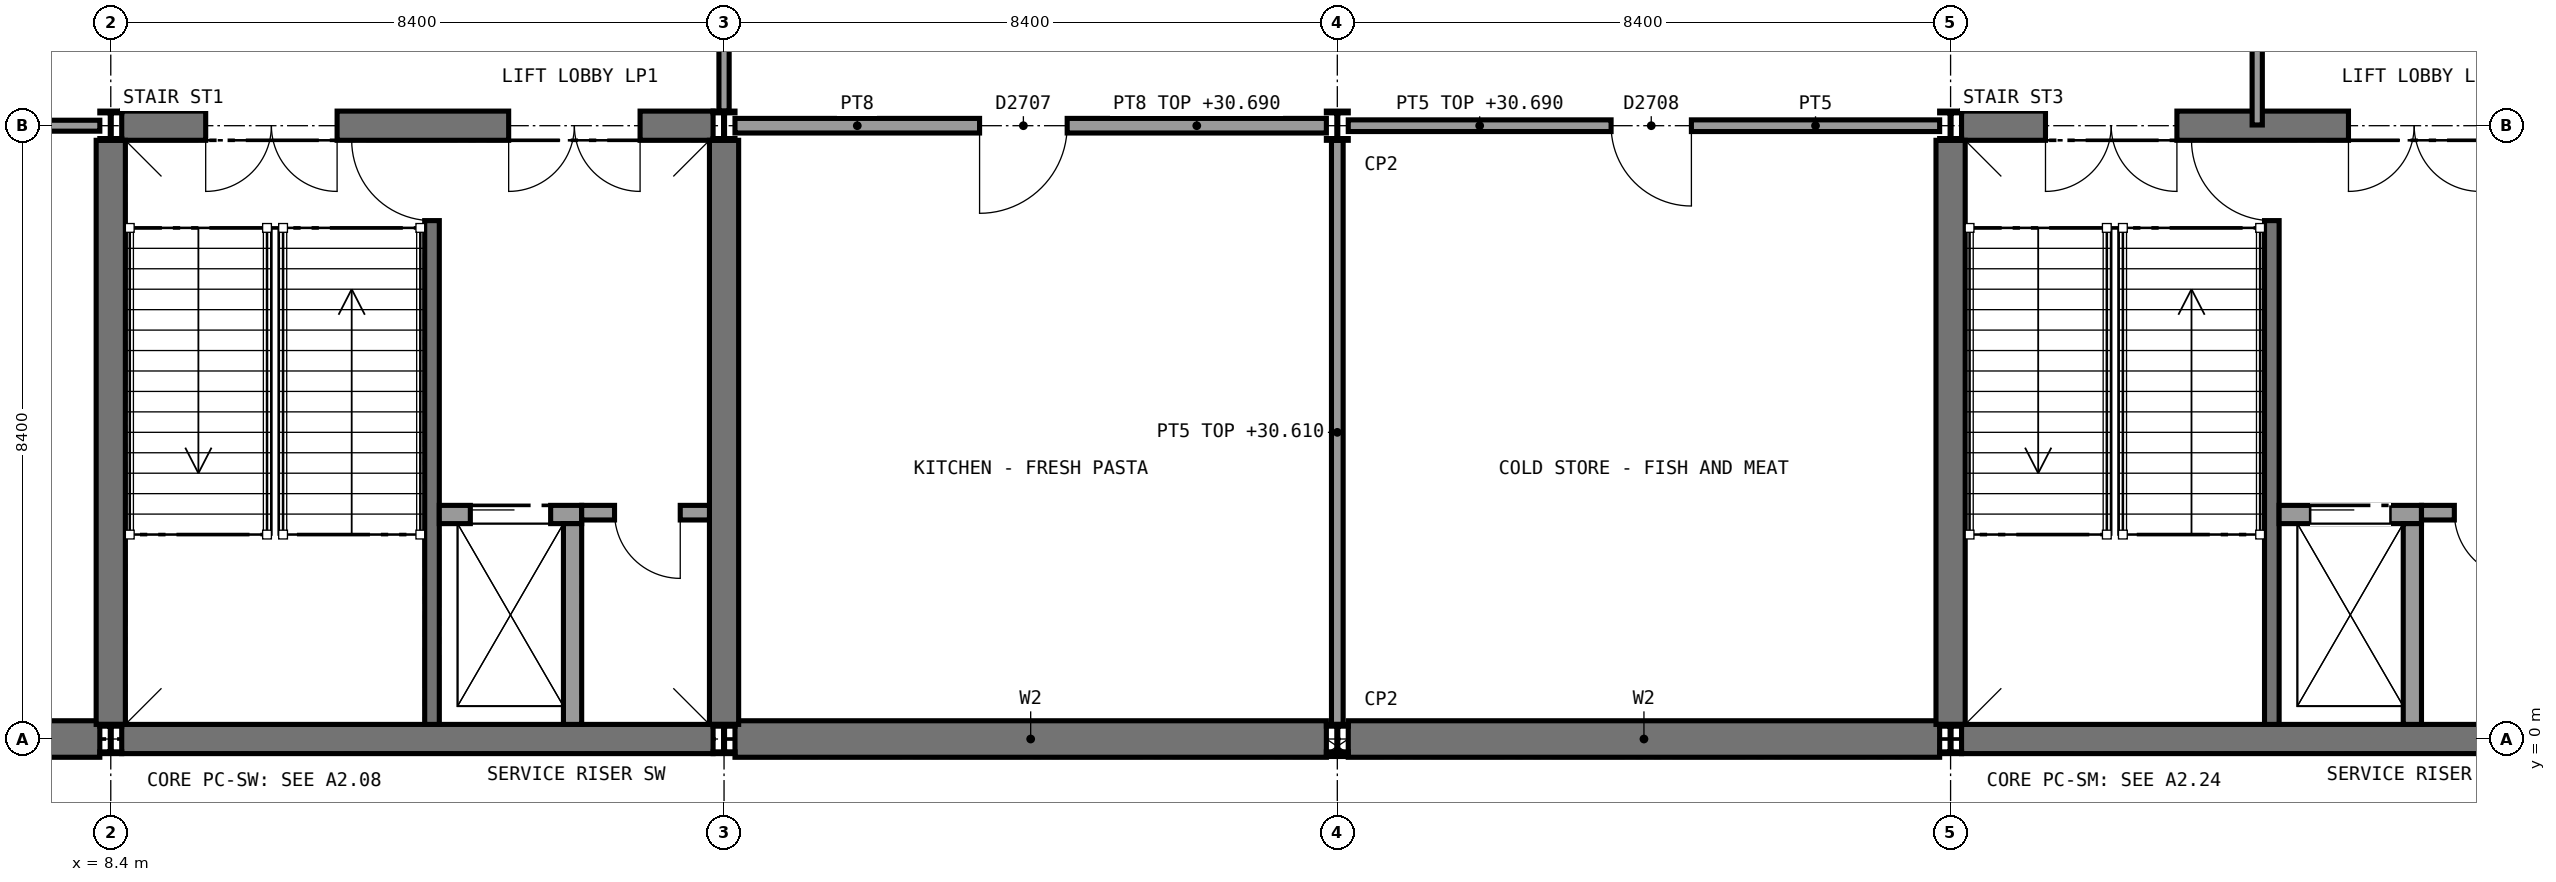
"""IFC4 building model, lengths in metres.
Left out: names, types, materials, properties, quantities, classifications, styles, units other than length and angle.
Written with IfcOpenShell. Run it as: python <this file> out.ifc"""

import sys

from ifc_helpers import new_model, si_unit, direction, frame, frame_2d, origin, origin_2d, place, context, subcontext, project, spatial, rectangle, i_section, extrude, element, fill, save


model = new_model("IFC4")
c1 = context("Model", 3, precision=1e-05, world=origin(), true_north=direction((0.0, 1.0)))
c2 = subcontext(c1, "Body", "Model", "MODEL_VIEW")
j1 = project(units=[si_unit("LENGTHUNIT", "METRE"), si_unit("PLANEANGLEUNIT", "RADIAN")], contexts=[c1])
p1 = place(None, origin())
s1 = spatial("IfcSite", under=j1, at=p1, CompositionType="ELEMENT")
p2 = place(p1, origin())
s2 = spatial("IfcBuilding", under=s1, at=p2, CompositionType="ELEMENT")
p3 = place(p2, frame((0.0, 0.0, 25.8)))
s3 = spatial("IfcBuildingStorey", under=s2, at=p3, CompositionType="ELEMENT", Elevation=25.8)
p4 = place(p3, frame((0.2, 0.0, 0.0), z_axis=(0.0, 0.0, 1.0), x_axis=(1.0, 0.0, 0.0)))
e1 = element("IfcWall", 1, at=p4, inside=s3, PredefinedType="SHEAR", context=c2, shape_type="SweptSolid", body=[
    extrude(rectangle(XDim=8.05, YDim=0.5, at=frame_2d((4.025, 0.0))), origin(), (0.0, 0.0, 1.0), 5.2),
])
p5 = place(p3, frame((16.95, 0.0, 0.0), z_axis=(0.0, 0.0, 1.0), x_axis=(1.0, 0.0, 0.0)))
e2 = element("IfcWall", 2, at=p5, inside=s3, PredefinedType="SHEAR", context=c2, shape_type="SweptSolid", body=[
    extrude(rectangle(XDim=8.1, YDim=0.5, at=frame_2d((4.05, 0.0))), origin(), (0.0, 0.0, 1.0), 5.2),
])
p6 = place(p3, frame((25.35, 0.0, 0.0), z_axis=(0.0, 0.0, 1.0), x_axis=(1.0, 0.0, 0.0)))
e3 = element("IfcWall", 3, at=p6, inside=s3, PredefinedType="SHEAR", context=c2, shape_type="SweptSolid", body=[
    extrude(rectangle(XDim=8.1, YDim=0.5, at=frame_2d((4.05, 0.0))), origin(), (0.0, 0.0, 1.0), 5.2),
])
p7 = place(p3, frame((8.55, 0.0, 0.0), z_axis=(0.0, 0.0, 1.0), x_axis=(1.0, 0.0, 0.0)))
e4 = element("IfcWall", 4, at=p7, inside=s3, PredefinedType="SHEAR", context=c2, shape_type="SweptSolid", body=[
    extrude(rectangle(XDim=8.1, YDim=0.4, at=frame_2d((4.05, 0.0))), origin(), (0.0, 0.0, 1.0), 4.51),
])
p8 = place(p3, frame((8.55, 8.4, 0.0), z_axis=(0.0, 0.0, 1.0), x_axis=(1.0, 0.0, 0.0)))
e5 = element("IfcWall", 5, at=p8, inside=s3, PredefinedType="SHEAR", context=c2, shape_type="SweptSolid", body=[
    extrude(rectangle(XDim=8.1, YDim=0.4, at=frame_2d((4.05, 0.0))), origin(), (0.0, 0.0, 1.0), 4.51),
])
p9 = place(p8, frame((1.15, 0.0, 0.0)))
e6 = element("IfcOpeningElement", 6, at=p9, cuts=e5, PredefinedType="OPENING", context=c2, shape_type="SweptSolid", body=[
    extrude(rectangle(XDim=1.8, YDim=2.1, at=frame_2d((0.9, 1.05))), frame((0.0, 0.21, 0.0), z_axis=(0.0, -1.0, 0.0), x_axis=(1.0, 0.0, 0.0)), (0.0, 0.0, 1.0), 0.42),
])
p10 = place(p8, frame((5.3, 0.0, 0.0)))
e7 = element("IfcOpeningElement", 7, at=p10, cuts=e5, PredefinedType="OPENING", context=c2, shape_type="SweptSolid", body=[
    extrude(rectangle(XDim=1.8, YDim=2.1, at=frame_2d((0.9, 1.05))), frame((0.0, 0.21, 0.0), z_axis=(0.0, -1.0, 0.0), x_axis=(1.0, 0.0, 0.0)), (0.0, 0.0, 1.0), 0.42),
])
for number, where, z_axis, x_axis in (
    (8, (8.4, 0.2, 0.0), (0.0, 0.0, 1.0), (0.0, 1.0, 0.0)),
    (9, (16.8, 0.2, 0.0), (0.0, 0.0, 1.0), (0.0, 1.0, 0.0)),
):
    element("IfcWall", number, at=place(p3, frame(where, z_axis=z_axis, x_axis=x_axis)), inside=s3, PredefinedType="SHEAR", context=c2, shape_type="SweptSolid", body=[
        extrude(rectangle(XDim=8.0, YDim=0.4, at=frame_2d((4.0, 0.0))), origin(), (0.0, 0.0, 1.0), 5.2),
    ])
p11 = place(p3, frame((33.75, 0.0, 0.0), z_axis=(0.0, 0.0, 1.0), x_axis=(1.0, 0.0, 0.0)))
e10 = element("IfcWall", 10, at=p11, inside=s3, PredefinedType="SHEAR", context=c2, shape_type="SweptSolid", body=[
    extrude(rectangle(XDim=8.1, YDim=0.4, at=frame_2d((4.05, 0.0))), origin(), (0.0, 0.0, 1.0), 4.51),
])
p12 = place(p3, frame((33.75, 8.4, 0.0), z_axis=(0.0, 0.0, 1.0), x_axis=(1.0, 0.0, 0.0)))
e11 = element("IfcWall", 11, at=p12, inside=s3, PredefinedType="SHEAR", context=c2, shape_type="SweptSolid", body=[
    extrude(rectangle(XDim=8.1, YDim=0.4, at=frame_2d((4.05, 0.0))), origin(), (0.0, 0.0, 1.0), 4.51),
])
p13 = place(p12, frame((1.15, 0.0, 0.0)))
e12 = element("IfcOpeningElement", 12, at=p13, cuts=e11, PredefinedType="OPENING", context=c2, shape_type="SweptSolid", body=[
    extrude(rectangle(XDim=1.8, YDim=2.1, at=frame_2d((0.9, 1.05))), frame((0.0, 0.21, 0.0), z_axis=(0.0, -1.0, 0.0), x_axis=(1.0, 0.0, 0.0)), (0.0, 0.0, 1.0), 0.42),
])
p14 = place(p12, frame((5.3, 0.0, 0.0)))
e13 = element("IfcOpeningElement", 13, at=p14, cuts=e11, PredefinedType="OPENING", context=c2, shape_type="SweptSolid", body=[
    extrude(rectangle(XDim=1.8, YDim=2.1, at=frame_2d((0.9, 1.05))), frame((0.0, 0.21, 0.0), z_axis=(0.0, -1.0, 0.0), x_axis=(1.0, 0.0, 0.0)), (0.0, 0.0, 1.0), 0.42),
])
p15 = place(p3, frame((33.6, 0.2, 0.0), z_axis=(0.0, 0.0, 1.0), x_axis=(0.0, 1.0, 0.0)))
e14 = element("IfcWall", 14, at=p15, inside=s3, PredefinedType="SHEAR", context=c2, shape_type="SweptSolid", body=[
    extrude(rectangle(XDim=8.0, YDim=0.4, at=frame_2d((4.0, 0.0))), origin(), (0.0, 0.0, 1.0), 5.2),
])
for number, where, z_axis, x_axis in (
    (15, (8.4, 0.0, 0.0), (0.0, 0.0, 1.0), (1.0, 0.0, 0.0)),
    (16, (8.4, 8.4, 0.0), (0.0, 0.0, 1.0), (1.0, 0.0, 0.0)),
    (17, (16.8, 0.0, 0.0), (0.0, 0.0, 1.0), (1.0, 0.0, 0.0)),
    (18, (16.8, 8.4, 0.0), (0.0, 0.0, 1.0), (1.0, 0.0, 0.0)),
    (19, (25.2, 0.0, 0.0), (0.0, 0.0, 1.0), (1.0, 0.0, 0.0)),
    (20, (25.2, 8.4, 0.0), (0.0, 0.0, 1.0), (1.0, 0.0, 0.0)),
    (21, (33.6, 0.0, 0.0), (0.0, 0.0, 1.0), (1.0, 0.0, 0.0)),
    (22, (33.6, 8.4, 0.0), (0.0, 0.0, 1.0), (1.0, 0.0, 0.0)),
):
    element("IfcColumn", number, at=place(p3, frame(where, z_axis=z_axis, x_axis=x_axis)), inside=s3, PredefinedType="COLUMN", context=c2, shape_type="SweptSolid", body=[
        extrude(i_section(OverallWidth=0.3, OverallDepth=0.4, WebThickness=0.013, FlangeThickness=0.024, FilletRadius=0.027, at=origin_2d()), origin(), (0.0, 0.0, 1.0), 5.4),
    ])
p16 = place(p3, frame((25.2, 0.2, 0.0), z_axis=(0.0, 0.0, 1.0), x_axis=(0.0, 1.0, 0.0)))
e23 = element("IfcWall", 23, at=p16, inside=s3, PredefinedType="PARTITIONING", context=c2, shape_type="SweptSolid", body=[
    extrude(rectangle(XDim=8.0, YDim=0.16, at=frame_2d((4.0, 0.0))), origin(), (0.0, 0.0, 1.0), 4.81),
])
p17 = place(p3, frame((16.95, 8.4, 0.0), z_axis=(0.0, 0.0, 1.0), x_axis=(1.0, 0.0, 0.0)))
e24 = element("IfcWall", 24, at=p17, inside=s3, PredefinedType="SOLIDWALL", context=c2, shape_type="SweptSolid", body=[
    extrude(rectangle(XDim=8.1, YDim=0.2, at=frame_2d((4.05, 0.0))), origin(), (0.0, 0.0, 1.0), 4.89),
])
p18 = place(p17, frame((3.35, 0.0, 0.0)))
e25 = element("IfcOpeningElement", 25, at=p18, cuts=e24, PredefinedType="OPENING", context=c2, shape_type="SweptSolid", body=[
    extrude(rectangle(XDim=1.2, YDim=2.1, at=frame_2d((0.6, 1.05))), frame((0.0, 0.11, 0.0), z_axis=(0.0, -1.0, 0.0), x_axis=(1.0, 0.0, 0.0)), (0.0, 0.0, 1.0), 0.22),
])
p19 = place(p3, frame((25.35, 8.4, 0.0), z_axis=(0.0, 0.0, 1.0), x_axis=(1.0, 0.0, 0.0)))
e26 = element("IfcWall", 26, at=p19, inside=s3, PredefinedType="PARTITIONING", context=c2, shape_type="SweptSolid", body=[
    extrude(rectangle(XDim=8.1, YDim=0.16, at=frame_2d((4.05, 0.0))), origin(), (0.0, 0.0, 1.0), 4.89),
])
p20 = place(p19, frame((3.6, 0.0, 0.0)))
e27 = element("IfcOpeningElement", 27, at=p20, cuts=e26, PredefinedType="OPENING", context=c2, shape_type="SweptSolid", body=[
    extrude(rectangle(XDim=1.1, YDim=2.1, at=frame_2d((0.55, 1.05))), frame((0.0, 0.09, 0.0), z_axis=(0.0, -1.0, 0.0), x_axis=(1.0, 0.0, 0.0)), (0.0, 0.0, 1.0), 0.18),
])
p21 = place(p3, frame((0.2, 8.4, 0.0), z_axis=(0.0, 0.0, 1.0), x_axis=(1.0, 0.0, 0.0)))
e28 = element("IfcWall", 28, at=p21, inside=s3, PredefinedType="SOLIDWALL", context=c2, shape_type="SweptSolid", body=[
    extrude(rectangle(XDim=8.05, YDim=0.15, at=frame_2d((4.025, 0.0))), origin(), (0.0, 0.0, 1.0), 4.81),
])
p22 = place(p21, frame((3.35, 0.0, 0.0)))
e29 = element("IfcOpeningElement", 29, at=p22, cuts=e28, PredefinedType="OPENING", context=c2, shape_type="SweptSolid", body=[
    extrude(rectangle(XDim=1.5, YDim=2.1, at=frame_2d((0.75, 1.05))), frame((0.0, 0.085, 0.0), z_axis=(0.0, -1.0, 0.0), x_axis=(1.0, 0.0, 0.0)), (0.0, 0.0, 1.0), 0.17),
])
p23 = place(p3, frame((16.8, 8.6, 0.0), z_axis=(0.0, 0.0, 1.0), x_axis=(0.0, 1.0, 0.0)))
e30 = element("IfcWall", 30, at=p23, inside=s3, PredefinedType="PARTITIONING", context=c2, shape_type="SweptSolid", body=[
    extrude(rectangle(XDim=3.1, YDim=0.14, at=frame_2d((1.55, 0.0))), origin(), (0.0, 0.0, 1.0), 4.81),
])
p24 = place(p3, frame((37.8, 8.41, 0.0), z_axis=(0.0, 0.0, 1.0), x_axis=(0.0, 1.0, 0.0)))
e31 = element("IfcWall", 31, at=p24, inside=s3, PredefinedType="PARTITIONING", context=c2, shape_type="SweptSolid", body=[
    extrude(rectangle(XDim=7.6, YDim=0.14, at=frame_2d((3.8, 0.0))), origin(), (0.0, 0.0, 1.0), 5.2),
])
p25 = place(p3, frame((12.8, 0.2, 0.0), z_axis=(0.0, 0.0, 1.0), x_axis=(0.0, 1.0, 0.0)))
e32 = element("IfcWall", 32, at=p25, inside=s3, PredefinedType="SHEAR", context=c2, shape_type="SweptSolid", body=[
    extrude(rectangle(XDim=8.0, YDim=0.2, at=frame_2d((4.0, 0.0))), origin(), (0.0, 0.0, 1.0), 5.2),
])
p26 = place(p25, frame((6.9, 0.0, 0.0)))
e33 = element("IfcOpeningElement", 33, at=p26, cuts=e32, PredefinedType="OPENING", context=c2, shape_type="SweptSolid", body=[
    extrude(rectangle(XDim=1.11, YDim=2.1, at=frame_2d((0.555, 1.05))), frame((0.0, 0.11, 0.0), z_axis=(0.0, -1.0, 0.0), x_axis=(1.0, 0.0, 0.0)), (0.0, 0.0, 1.0), 0.22),
])
p27 = place(p3, frame((12.9, 3.075, 0.0), z_axis=(0.0, 0.0, 1.0), x_axis=(1.0, 0.0, 0.0)))
e34 = element("IfcWall", 34, at=p27, inside=s3, PredefinedType="SOLIDWALL", context=c2, shape_type="SweptSolid", body=[
    extrude(rectangle(XDim=1.95, YDim=0.25, at=frame_2d((0.975, 0.0))), origin(), (0.0, 0.0, 1.0), 5.2),
])
p28 = place(p27, frame((0.425, 0.0, 0.0)))
e35 = element("IfcOpeningElement", 35, at=p28, cuts=e34, PredefinedType="OPENING", context=c2, shape_type="SweptSolid", body=[
    extrude(rectangle(XDim=1.1, YDim=2.1, at=frame_2d((0.55, 1.05))), frame((0.0, 0.135, 0.0), z_axis=(0.0, -1.0, 0.0), x_axis=(1.0, 0.0, 0.0)), (0.0, 0.0, 1.0), 0.27),
])
p29 = place(p3, frame((14.725, 0.2, 0.0), z_axis=(0.0, 0.0, 1.0), x_axis=(0.0, 1.0, 0.0)))
e36 = element("IfcWall", 36, at=p29, inside=s3, PredefinedType="SOLIDWALL", context=c2, shape_type="SweptSolid", body=[
    extrude(rectangle(XDim=2.75, YDim=0.25, at=frame_2d((1.375, 0.0))), origin(), (0.0, 0.0, 1.0), 5.2),
])
p30 = place(p3, frame((14.85, 3.1, 0.0), z_axis=(0.0, 0.0, 1.0), x_axis=(1.0, 0.0, 0.0)))
e37 = element("IfcWall", 37, at=p30, inside=s3, PredefinedType="PARTITIONING", context=c2, shape_type="SweptSolid", body=[
    extrude(rectangle(XDim=1.75, YDim=0.2, at=frame_2d((0.875, 0.0))), origin(), (0.0, 0.0, 1.0), 5.2),
])
p31 = place(p30, frame((0.45, 0.0, 0.0)))
e38 = element("IfcOpeningElement", 38, at=p31, cuts=e37, PredefinedType="OPENING", context=c2, shape_type="SweptSolid", body=[
    extrude(rectangle(XDim=0.9, YDim=2.1, at=frame_2d((0.45, 1.05))), frame((0.0, 0.11, 0.0), z_axis=(0.0, -1.0, 0.0), x_axis=(1.0, 0.0, 0.0)), (0.0, 0.0, 1.0), 0.22),
])
p32 = place(p3, frame((38.0, 0.2, 0.0), z_axis=(0.0, 0.0, 1.0), x_axis=(0.0, 1.0, 0.0)))
e39 = element("IfcWall", 39, at=p32, inside=s3, PredefinedType="SHEAR", context=c2, shape_type="SweptSolid", body=[
    extrude(rectangle(XDim=8.0, YDim=0.2, at=frame_2d((4.0, 0.0))), origin(), (0.0, 0.0, 1.0), 5.2),
])
p33 = place(p32, frame((6.9, 0.0, 0.0)))
e40 = element("IfcOpeningElement", 40, at=p33, cuts=e39, PredefinedType="OPENING", context=c2, shape_type="SweptSolid", body=[
    extrude(rectangle(XDim=1.11, YDim=2.1, at=frame_2d((0.555, 1.05))), frame((0.0, 0.11, 0.0), z_axis=(0.0, -1.0, 0.0), x_axis=(1.0, 0.0, 0.0)), (0.0, 0.0, 1.0), 0.22),
])
p34 = place(p3, frame((38.1, 3.075, 0.0), z_axis=(0.0, 0.0, 1.0), x_axis=(1.0, 0.0, 0.0)))
e41 = element("IfcWall", 41, at=p34, inside=s3, PredefinedType="SOLIDWALL", context=c2, shape_type="SweptSolid", body=[
    extrude(rectangle(XDim=1.95, YDim=0.25, at=frame_2d((0.975, 0.0))), origin(), (0.0, 0.0, 1.0), 5.2),
])
p35 = place(p34, frame((0.425, 0.0, 0.0)))
e42 = element("IfcOpeningElement", 42, at=p35, cuts=e41, PredefinedType="OPENING", context=c2, shape_type="SweptSolid", body=[
    extrude(rectangle(XDim=1.1, YDim=2.1, at=frame_2d((0.55, 1.05))), frame((0.0, 0.135, 0.0), z_axis=(0.0, -1.0, 0.0), x_axis=(1.0, 0.0, 0.0)), (0.0, 0.0, 1.0), 0.27),
])
p36 = place(p3, frame((39.925, 0.2, 0.0), z_axis=(0.0, 0.0, 1.0), x_axis=(0.0, 1.0, 0.0)))
e43 = element("IfcWall", 43, at=p36, inside=s3, PredefinedType="SOLIDWALL", context=c2, shape_type="SweptSolid", body=[
    extrude(rectangle(XDim=2.75, YDim=0.25, at=frame_2d((1.375, 0.0))), origin(), (0.0, 0.0, 1.0), 5.2),
])
p37 = place(p3, frame((40.05, 3.1, 0.0), z_axis=(0.0, 0.0, 1.0), x_axis=(1.0, 0.0, 0.0)))
e44 = element("IfcWall", 44, at=p37, inside=s3, PredefinedType="PARTITIONING", context=c2, shape_type="SweptSolid", body=[
    extrude(rectangle(XDim=1.75, YDim=0.2, at=frame_2d((0.875, 0.0))), origin(), (0.0, 0.0, 1.0), 5.2),
])
p38 = place(p37, frame((0.45, 0.0, 0.0)))
e45 = element("IfcOpeningElement", 45, at=p38, cuts=e44, PredefinedType="OPENING", context=c2, shape_type="SweptSolid", body=[
    extrude(rectangle(XDim=0.9, YDim=2.1, at=frame_2d((0.45, 1.05))), frame((0.0, 0.11, 0.0), z_axis=(0.0, -1.0, 0.0), x_axis=(1.0, 0.0, 0.0)), (0.0, 0.0, 1.0), 0.22),
])
p39 = place(p18, frame((1.2, 0.0, 0.0), z_axis=(0.0, 0.0, 1.0), x_axis=(-1.0, 0.0, 0.0)))
e46 = element("IfcDoor", 46, at=p39, inside=s3, OperationType="SINGLE_SWING_RIGHT", PredefinedType="DOOR", context=c2, shape_type="SweptSolid", body=[
    extrude(rectangle(XDim=1.2, YDim=2.1, at=frame_2d((0.6, 1.05))), frame((0.0, 0.025, 0.0), z_axis=(0.0, -1.0, 0.0), x_axis=(1.0, 0.0, 0.0)), (0.0, 0.0, 1.0), 0.05),
])
fill(e25, e46)
p40 = place(p20, frame((1.1, 0.0, 0.0), z_axis=(0.0, 0.0, 1.0), x_axis=(-1.0, 0.0, 0.0)))
e47 = element("IfcDoor", 47, at=p40, inside=s3, OperationType="SINGLE_SWING_LEFT", PredefinedType="DOOR", context=c2, shape_type="SweptSolid", body=[
    extrude(rectangle(XDim=1.1, YDim=2.1, at=frame_2d((0.55, 1.05))), frame((0.0, 0.025, 0.0), z_axis=(0.0, -1.0, 0.0), x_axis=(1.0, 0.0, 0.0)), (0.0, 0.0, 1.0), 0.05),
])
fill(e27, e47)
p41 = place(p26, origin())
e48 = element("IfcDoor", 48, at=p41, inside=s3, OperationType="SINGLE_SWING_RIGHT", PredefinedType="DOOR", context=c2, shape_type="SweptSolid", body=[
    extrude(rectangle(XDim=1.1, YDim=2.1, at=frame_2d((0.55, 1.05))), frame((0.0, 0.025, 0.0), z_axis=(0.0, -1.0, 0.0), x_axis=(1.0, 0.0, 0.0)), (0.0, 0.0, 1.0), 0.05),
])
fill(e33, e48)
p42 = place(p28, origin())
e49 = element("IfcDoor", 49, at=p42, inside=s3, OperationType="SLIDING_TO_LEFT", PredefinedType="DOOR", context=c2, shape_type="SweptSolid", body=[
    extrude(rectangle(XDim=1.1, YDim=2.1, at=frame_2d((0.55, 1.05))), frame((0.0, 0.025, 0.0), z_axis=(0.0, -1.0, 0.0), x_axis=(1.0, 0.0, 0.0)), (0.0, 0.0, 1.0), 0.05),
])
fill(e35, e49)
p43 = place(p31, frame((0.9, 0.0, 0.0), z_axis=(0.0, 0.0, 1.0), x_axis=(-1.0, 0.0, 0.0)))
e50 = element("IfcDoor", 50, at=p43, inside=s3, OperationType="SINGLE_SWING_LEFT", PredefinedType="DOOR", context=c2, shape_type="SweptSolid", body=[
    extrude(rectangle(XDim=0.9, YDim=2.1, at=frame_2d((0.45, 1.05))), frame((0.0, 0.025, 0.0), z_axis=(0.0, -1.0, 0.0), x_axis=(1.0, 0.0, 0.0)), (0.0, 0.0, 1.0), 0.05),
])
fill(e38, e50)
p44 = place(p9, frame((1.8, 0.0, 0.0), z_axis=(0.0, 0.0, 1.0), x_axis=(-1.0, 0.0, 0.0)))
e51 = element("IfcDoor", 51, at=p44, inside=s3, OperationType="DOUBLE_DOOR_SINGLE_SWING", PredefinedType="DOOR", context=c2, shape_type="SweptSolid", body=[
    extrude(rectangle(XDim=1.8, YDim=2.1, at=frame_2d((0.9, 1.05))), frame((0.0, 0.025, 0.0), z_axis=(0.0, -1.0, 0.0), x_axis=(1.0, 0.0, 0.0)), (0.0, 0.0, 1.0), 0.05),
])
fill(e6, e51)
p45 = place(p10, frame((1.8, 0.0, 0.0), z_axis=(0.0, 0.0, 1.0), x_axis=(-1.0, 0.0, 0.0)))
e52 = element("IfcDoor", 52, at=p45, inside=s3, OperationType="DOUBLE_DOOR_SINGLE_SWING", PredefinedType="DOOR", context=c2, shape_type="SweptSolid", body=[
    extrude(rectangle(XDim=1.8, YDim=2.1, at=frame_2d((0.9, 1.05))), frame((0.0, 0.025, 0.0), z_axis=(0.0, -1.0, 0.0), x_axis=(1.0, 0.0, 0.0)), (0.0, 0.0, 1.0), 0.05),
])
fill(e7, e52)
p46 = place(p33, origin())
e53 = element("IfcDoor", 53, at=p46, inside=s3, OperationType="SINGLE_SWING_RIGHT", PredefinedType="DOOR", context=c2, shape_type="SweptSolid", body=[
    extrude(rectangle(XDim=1.1, YDim=2.1, at=frame_2d((0.55, 1.05))), frame((0.0, 0.025, 0.0), z_axis=(0.0, -1.0, 0.0), x_axis=(1.0, 0.0, 0.0)), (0.0, 0.0, 1.0), 0.05),
])
fill(e40, e53)
p47 = place(p35, origin())
e54 = element("IfcDoor", 54, at=p47, inside=s3, OperationType="SLIDING_TO_LEFT", PredefinedType="DOOR", context=c2, shape_type="SweptSolid", body=[
    extrude(rectangle(XDim=1.1, YDim=2.1, at=frame_2d((0.55, 1.05))), frame((0.0, 0.025, 0.0), z_axis=(0.0, -1.0, 0.0), x_axis=(1.0, 0.0, 0.0)), (0.0, 0.0, 1.0), 0.05),
])
fill(e42, e54)
p48 = place(p38, frame((0.9, 0.0, 0.0), z_axis=(0.0, 0.0, 1.0), x_axis=(-1.0, 0.0, 0.0)))
e55 = element("IfcDoor", 55, at=p48, inside=s3, OperationType="SINGLE_SWING_LEFT", PredefinedType="DOOR", context=c2, shape_type="SweptSolid", body=[
    extrude(rectangle(XDim=0.9, YDim=2.1, at=frame_2d((0.45, 1.05))), frame((0.0, 0.025, 0.0), z_axis=(0.0, -1.0, 0.0), x_axis=(1.0, 0.0, 0.0)), (0.0, 0.0, 1.0), 0.05),
])
fill(e45, e55)
p49 = place(p13, frame((1.8, 0.0, 0.0), z_axis=(0.0, 0.0, 1.0), x_axis=(-1.0, 0.0, 0.0)))
e56 = element("IfcDoor", 56, at=p49, inside=s3, OperationType="DOUBLE_DOOR_SINGLE_SWING", PredefinedType="DOOR", context=c2, shape_type="SweptSolid", body=[
    extrude(rectangle(XDim=1.8, YDim=2.1, at=frame_2d((0.9, 1.05))), frame((0.0, 0.025, 0.0), z_axis=(0.0, -1.0, 0.0), x_axis=(1.0, 0.0, 0.0)), (0.0, 0.0, 1.0), 0.05),
])
fill(e12, e56)
p50 = place(p14, frame((1.8, 0.0, 0.0), z_axis=(0.0, 0.0, 1.0), x_axis=(-1.0, 0.0, 0.0)))
e57 = element("IfcDoor", 57, at=p50, inside=s3, OperationType="DOUBLE_DOOR_SINGLE_SWING", PredefinedType="DOOR", context=c2, shape_type="SweptSolid", body=[
    extrude(rectangle(XDim=1.8, YDim=2.1, at=frame_2d((0.9, 1.05))), frame((0.0, 0.025, 0.0), z_axis=(0.0, -1.0, 0.0), x_axis=(1.0, 0.0, 0.0)), (0.0, 0.0, 1.0), 0.05),
])
fill(e13, e57)
save(model, sys.argv[1])
